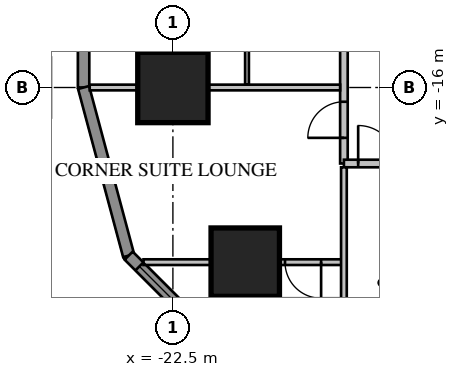
"""IFC4 building model, lengths in metres.
Left out: names, types, materials, properties, quantities, classifications, styles, units other than length and angle.
Written with IfcOpenShell. Run it as: python <this file> out.ifc"""

import sys

from ifc_helpers import new_model, si_unit, direction, frame, frame_2d, origin, origin_2d, place, context, subcontext, project, spatial, rectangle, extrude, element, fill, save


model = new_model("IFC4")
c1 = context("Model", 3, precision=1e-05, world=origin(), true_north=direction((0.0, 1.0)))
c2 = subcontext(c1, "Body", "Model", "MODEL_VIEW")
j1 = project(units=[si_unit("LENGTHUNIT", "METRE"), si_unit("PLANEANGLEUNIT", "RADIAN")], contexts=[c1])
p1 = place(None, origin())
s1 = spatial("IfcSite", under=j1, at=p1, CompositionType="ELEMENT")
p2 = place(p1, origin())
s2 = spatial("IfcBuilding", under=s1, at=p2, CompositionType="ELEMENT")
p3 = place(p2, frame((0.0, 0.0, 50.65)))
s3 = spatial("IfcBuildingStorey", under=s2, at=p3, CompositionType="ELEMENT", Elevation=50.65)
p4 = place(p3, frame((-22.5, -16.0, 0.0), z_axis=(0.0, 0.0, 1.0), x_axis=(1.0, 0.0, 0.0)))
e1 = element("IfcColumn", 1, at=p4, inside=s3, PredefinedType="COLUMN", context=c2, shape_type="SweptSolid", body=[
    extrude(rectangle(XDim=1.85, YDim=1.85, at=origin_2d()), origin(), (0.0, 0.0, 1.0), 3.413),
])
p5 = place(p3, frame((-20.596, -20.596, 0.0), z_axis=(0.0, 0.0, 1.0), x_axis=(1.0, 0.0, 0.0)))
e2 = element("IfcColumn", 2, at=p5, inside=s3, PredefinedType="COLUMN", context=c2, shape_type="SweptSolid", body=[
    extrude(rectangle(XDim=1.8, YDim=1.8, at=origin_2d()), origin(), (0.0, 0.0, 1.0), 3.413),
])
p6 = place(p3, frame((-24.85, 16.0, 0.0), z_axis=(0.0, 0.0, 1.0), x_axis=(0.0, -1.0, 0.0)))
e3 = element("IfcWall", 3, at=p6, inside=s3, PredefinedType="SOLIDWALL", context=c2, shape_type="SweptSolid", body=[
    extrude(rectangle(XDim=32.0, YDim=0.3, at=frame_2d((16.0, 0.0))), origin(), (0.0, 0.0, 1.0), 3.65),
])
p7 = place(p6, frame((1.2, 0.0, 0.75)))
e4 = element("IfcOpeningElement", 4, at=p7, cuts=e3, PredefinedType="OPENING", context=c2, shape_type="SweptSolid", body=[
    extrude(rectangle(XDim=1.6, YDim=1.8, at=frame_2d((0.8, 0.9))), frame((0.0, 0.17, 0.0), z_axis=(0.0, -1.0, 0.0), x_axis=(1.0, 0.0, 0.0)), (0.0, 0.0, 1.0), 0.34),
])
p8 = place(p6, frame((5.2, 0.0, 0.75)))
e5 = element("IfcOpeningElement", 5, at=p8, cuts=e3, PredefinedType="OPENING", context=c2, shape_type="SweptSolid", body=[
    extrude(rectangle(XDim=1.6, YDim=1.8, at=frame_2d((0.8, 0.9))), frame((0.0, 0.17, 0.0), z_axis=(0.0, -1.0, 0.0), x_axis=(1.0, 0.0, 0.0)), (0.0, 0.0, 1.0), 0.34),
])
p9 = place(p6, frame((17.2, 0.0, 0.75)))
e6 = element("IfcOpeningElement", 6, at=p9, cuts=e3, PredefinedType="OPENING", context=c2, shape_type="SweptSolid", body=[
    extrude(rectangle(XDim=1.6, YDim=1.8, at=frame_2d((0.8, 0.9))), frame((0.0, 0.17, 0.0), z_axis=(0.0, -1.0, 0.0), x_axis=(1.0, 0.0, 0.0)), (0.0, 0.0, 1.0), 0.34),
])
p10 = place(p6, frame((21.2, 0.0, 0.75)))
e7 = element("IfcOpeningElement", 7, at=p10, cuts=e3, PredefinedType="OPENING", context=c2, shape_type="SweptSolid", body=[
    extrude(rectangle(XDim=1.6, YDim=1.8, at=frame_2d((0.8, 0.9))), frame((0.0, 0.17, 0.0), z_axis=(0.0, -1.0, 0.0), x_axis=(1.0, 0.0, 0.0)), (0.0, 0.0, 1.0), 0.34),
])
p11 = place(p6, frame((25.2, 0.0, 0.75)))
e8 = element("IfcOpeningElement", 8, at=p11, cuts=e3, PredefinedType="OPENING", context=c2, shape_type="SweptSolid", body=[
    extrude(rectangle(XDim=1.6, YDim=1.8, at=frame_2d((0.8, 0.9))), frame((0.0, 0.17, 0.0), z_axis=(0.0, -1.0, 0.0), x_axis=(1.0, 0.0, 0.0)), (0.0, 0.0, 1.0), 0.34),
])
p12 = place(p6, frame((29.2, 0.0, 0.75)))
e9 = element("IfcOpeningElement", 9, at=p12, cuts=e3, PredefinedType="OPENING", context=c2, shape_type="SweptSolid", body=[
    extrude(rectangle(XDim=1.6, YDim=1.8, at=frame_2d((0.8, 0.9))), frame((0.0, 0.17, 0.0), z_axis=(0.0, -1.0, 0.0), x_axis=(1.0, 0.0, 0.0)), (0.0, 0.0, 1.0), 0.34),
])
p13 = place(p6, frame((8.8, 0.0, 0.75)))
e10 = element("IfcOpeningElement", 10, at=p13, cuts=e3, PredefinedType="OPENING", context=c2, shape_type="SweptSolid", body=[
    extrude(rectangle(XDim=2.4, YDim=1.8, at=frame_2d((1.2, 0.9))), frame((0.0, 0.17, 0.0), z_axis=(0.0, -1.0, 0.0), x_axis=(1.0, 0.0, 0.0)), (0.0, 0.0, 1.0), 0.34),
])
p14 = place(p6, frame((13.812, 0.0, 0.0)))
e11 = element("IfcOpeningElement", 11, at=p14, cuts=e3, PredefinedType="OPENING", context=c2, shape_type="SweptSolid", body=[
    extrude(rectangle(XDim=1.0, YDim=2.4, at=frame_2d((0.5, 1.2))), frame((0.0, 0.17, 0.0), z_axis=(0.0, -1.0, 0.0), x_axis=(1.0, 0.0, 0.0)), (0.0, 0.0, 1.0), 0.34),
])
p15 = place(p3, frame((-24.85, -16.0, 0.0), z_axis=(0.0, 0.0, 1.0), x_axis=(0.258839972501, -0.965920218567, 0.0)))
e12 = element("IfcWall", 12, at=p15, inside=s3, PredefinedType="SOLIDWALL", context=c2, shape_type="SweptSolid", body=[
    extrude(rectangle(XDim=4.581, YDim=0.3, at=frame_2d((2.291, 0.0))), origin(), (0.0, 0.0, 1.0), 3.65),
])
p16 = place(p3, frame((-23.664, -20.425, 0.0), z_axis=(0.0, 0.0, 1.0), x_axis=(0.707106781187, -0.707106781187, 0.0)))
e13 = element("IfcWall", 13, at=p16, inside=s3, PredefinedType="SOLIDWALL", context=c2, shape_type="SweptSolid", body=[
    extrude(rectangle(XDim=4.581, YDim=0.3, at=frame_2d((2.291, 0.0))), origin(), (0.0, 0.0, 1.0), 3.65),
])
p17 = place(p16, frame((0.4, 0.0, 0.75)))
e14 = element("IfcOpeningElement", 14, at=p17, cuts=e13, PredefinedType="OPENING", context=c2, shape_type="SweptSolid", body=[
    extrude(rectangle(XDim=3.781, YDim=1.8, at=frame_2d((1.891, 0.9))), frame((0.0, 0.17, 0.0), z_axis=(0.0, -1.0, 0.0), x_axis=(1.0, 0.0, 0.0)), (0.0, 0.0, 1.0), 0.34),
])
p18 = place(p3, frame((-18.0, 18.0, 0.0), z_axis=(0.0, 0.0, 1.0), x_axis=(0.0, -1.0, 0.0)))
e15 = element("IfcWall", 15, at=p18, inside=s3, PredefinedType="PARTITIONING", context=c2, shape_type="SweptSolid", body=[
    extrude(rectangle(XDim=36.0, YDim=0.2, at=frame_2d((18.0, 0.0))), origin(), (0.0, 0.0, 1.0), 3.65),
])
p19 = place(p18, frame((0.375, 0.0, 0.0)))
e16 = element("IfcOpeningElement", 16, at=p19, cuts=e15, PredefinedType="OPENING", context=c2, shape_type="SweptSolid", body=[
    extrude(rectangle(XDim=1.0, YDim=2.1, at=frame_2d((0.5, 1.05))), frame((0.0, 0.12, 0.0), z_axis=(0.0, -1.0, 0.0), x_axis=(1.0, 0.0, 0.0)), (0.0, 0.0, 1.0), 0.24),
])
p20 = place(p18, frame((2.375, 0.0, 0.0)))
e17 = element("IfcOpeningElement", 17, at=p20, cuts=e15, PredefinedType="OPENING", context=c2, shape_type="SweptSolid", body=[
    extrude(rectangle(XDim=0.95, YDim=2.1, at=frame_2d((0.475, 1.05))), frame((0.0, 0.12, 0.0), z_axis=(0.0, -1.0, 0.0), x_axis=(1.0, 0.0, 0.0)), (0.0, 0.0, 1.0), 0.24),
])
p21 = place(p18, frame((7.95, 0.0, 0.0)))
e18 = element("IfcOpeningElement", 18, at=p21, cuts=e15, PredefinedType="OPENING", context=c2, shape_type="SweptSolid", body=[
    extrude(rectangle(XDim=0.95, YDim=2.1, at=frame_2d((0.475, 1.05))), frame((0.0, 0.12, 0.0), z_axis=(0.0, -1.0, 0.0), x_axis=(1.0, 0.0, 0.0)), (0.0, 0.0, 1.0), 0.24),
])
p22 = place(p18, frame((18.375, 0.0, 0.0)))
e19 = element("IfcOpeningElement", 19, at=p22, cuts=e15, PredefinedType="OPENING", context=c2, shape_type="SweptSolid", body=[
    extrude(rectangle(XDim=0.95, YDim=2.1, at=frame_2d((0.475, 1.05))), frame((0.0, 0.12, 0.0), z_axis=(0.0, -1.0, 0.0), x_axis=(1.0, 0.0, 0.0)), (0.0, 0.0, 1.0), 0.24),
])
p23 = place(p18, frame((23.95, 0.0, 0.0)))
e20 = element("IfcOpeningElement", 20, at=p23, cuts=e15, PredefinedType="OPENING", context=c2, shape_type="SweptSolid", body=[
    extrude(rectangle(XDim=0.95, YDim=2.1, at=frame_2d((0.475, 1.05))), frame((0.0, 0.12, 0.0), z_axis=(0.0, -1.0, 0.0), x_axis=(1.0, 0.0, 0.0)), (0.0, 0.0, 1.0), 0.24),
])
p24 = place(p18, frame((26.375, 0.0, 0.0)))
e21 = element("IfcOpeningElement", 21, at=p24, cuts=e15, PredefinedType="OPENING", context=c2, shape_type="SweptSolid", body=[
    extrude(rectangle(XDim=0.95, YDim=2.1, at=frame_2d((0.475, 1.05))), frame((0.0, 0.12, 0.0), z_axis=(0.0, -1.0, 0.0), x_axis=(1.0, 0.0, 0.0)), (0.0, 0.0, 1.0), 0.24),
])
p25 = place(p18, frame((31.95, 0.0, 0.0)))
e22 = element("IfcOpeningElement", 22, at=p25, cuts=e15, PredefinedType="OPENING", context=c2, shape_type="SweptSolid", body=[
    extrude(rectangle(XDim=0.95, YDim=2.1, at=frame_2d((0.475, 1.05))), frame((0.0, 0.12, 0.0), z_axis=(0.0, -1.0, 0.0), x_axis=(1.0, 0.0, 0.0)), (0.0, 0.0, 1.0), 0.24),
])
p26 = place(p18, frame((34.375, 0.0, 0.0)))
e23 = element("IfcOpeningElement", 23, at=p26, cuts=e15, PredefinedType="OPENING", context=c2, shape_type="SweptSolid", body=[
    extrude(rectangle(XDim=0.95, YDim=2.1, at=frame_2d((0.475, 1.05))), frame((0.0, 0.12, 0.0), z_axis=(0.0, -1.0, 0.0), x_axis=(1.0, 0.0, 0.0)), (0.0, 0.0, 1.0), 0.24),
])
p27 = place(p18, frame((11.2, 0.0, 0.0)))
e24 = element("IfcOpeningElement", 24, at=p27, cuts=e15, PredefinedType="OPENING", context=c2, shape_type="SweptSolid", body=[
    extrude(rectangle(XDim=1.0, YDim=2.1, at=frame_2d((0.5, 1.05))), frame((0.0, 0.12, 0.0), z_axis=(0.0, -1.0, 0.0), x_axis=(1.0, 0.0, 0.0)), (0.0, 0.0, 1.0), 0.24),
])
p28 = place(p3, frame((-18.1, -16.0, 0.0), z_axis=(0.0, 0.0, 1.0), x_axis=(-1.0, 0.0, 0.0)))
e25 = element("IfcWall", 25, at=p28, inside=s3, PredefinedType="PARTITIONING", context=c2, shape_type="SweptSolid", body=[
    extrude(rectangle(XDim=6.589, YDim=0.15, at=frame_2d((3.295, 0.0))), origin(), (0.0, 0.0, 1.0), 3.65),
])
p29 = place(p3, frame((-18.065, -20.596, 0.0), z_axis=(0.0, 0.0, 1.0), x_axis=(-1.0, 0.0, 0.0)))
e26 = element("IfcWall", 26, at=p29, inside=s3, PredefinedType="PARTITIONING", context=c2, shape_type="SweptSolid", body=[
    extrude(rectangle(XDim=5.209, YDim=0.15, at=frame_2d((2.604, 0.0))), origin(), (0.0, 0.0, 1.0), 3.65),
])
p30 = place(p29, frame((0.535, 0.0, 0.0)))
e27 = element("IfcOpeningElement", 27, at=p30, cuts=e26, PredefinedType="OPENING", context=c2, shape_type="SweptSolid", body=[
    extrude(rectangle(XDim=0.95, YDim=2.1, at=frame_2d((0.475, 1.05))), frame((0.0, 0.095, 0.0), z_axis=(0.0, -1.0, 0.0), x_axis=(1.0, 0.0, 0.0)), (0.0, 0.0, 1.0), 0.19),
])
p31 = place(p3, frame((-18.0, -18.0, 0.0), z_axis=(0.0, 0.0, 1.0), x_axis=(1.0, 0.0, 0.0)))
e28 = element("IfcWall", 28, at=p31, inside=s3, PredefinedType="PARTITIONING", context=c2, shape_type="SweptSolid", body=[
    extrude(rectangle(XDim=36.0, YDim=0.2, at=frame_2d((18.0, 0.0))), origin(), (0.0, 0.0, 1.0), 3.65),
])
p32 = place(p31, frame((0.375, 0.0, 0.0)))
e29 = element("IfcOpeningElement", 29, at=p32, cuts=e28, PredefinedType="OPENING", context=c2, shape_type="SweptSolid", body=[
    extrude(rectangle(XDim=1.0, YDim=2.1, at=frame_2d((0.5, 1.05))), frame((0.0, 0.12, 0.0), z_axis=(0.0, -1.0, 0.0), x_axis=(1.0, 0.0, 0.0)), (0.0, 0.0, 1.0), 0.24),
])
p33 = place(p31, frame((2.45, 0.0, 0.0)))
e30 = element("IfcOpeningElement", 30, at=p33, cuts=e28, PredefinedType="OPENING", context=c2, shape_type="SweptSolid", body=[
    extrude(rectangle(XDim=0.8, YDim=2.1, at=frame_2d((0.4, 1.05))), frame((0.0, 0.12, 0.0), z_axis=(0.0, -1.0, 0.0), x_axis=(1.0, 0.0, 0.0)), (0.0, 0.0, 1.0), 0.24),
])
p34 = place(p31, frame((4.05, 0.0, 0.0)))
e31 = element("IfcOpeningElement", 31, at=p34, cuts=e28, PredefinedType="OPENING", context=c2, shape_type="SweptSolid", body=[
    extrude(rectangle(XDim=1.0, YDim=2.1, at=frame_2d((0.5, 1.05))), frame((0.0, 0.12, 0.0), z_axis=(0.0, -1.0, 0.0), x_axis=(1.0, 0.0, 0.0)), (0.0, 0.0, 1.0), 0.24),
])
p35 = place(p31, frame((6.45, 0.0, 0.0)))
e32 = element("IfcOpeningElement", 32, at=p35, cuts=e28, PredefinedType="OPENING", context=c2, shape_type="SweptSolid", body=[
    extrude(rectangle(XDim=0.9, YDim=2.1, at=frame_2d((0.45, 1.05))), frame((0.0, 0.12, 0.0), z_axis=(0.0, -1.0, 0.0), x_axis=(1.0, 0.0, 0.0)), (0.0, 0.0, 1.0), 0.24),
])
p36 = place(p31, frame((8.15, 0.0, 0.0)))
e33 = element("IfcOpeningElement", 33, at=p36, cuts=e28, PredefinedType="OPENING", context=c2, shape_type="SweptSolid", body=[
    extrude(rectangle(XDim=1.0, YDim=2.1, at=frame_2d((0.5, 1.05))), frame((0.0, 0.12, 0.0), z_axis=(0.0, -1.0, 0.0), x_axis=(1.0, 0.0, 0.0)), (0.0, 0.0, 1.0), 0.24),
])
p37 = place(p31, frame((19.95, 0.0, 0.0)))
e34 = element("IfcOpeningElement", 34, at=p37, cuts=e28, PredefinedType="OPENING", context=c2, shape_type="SweptSolid", body=[
    extrude(rectangle(XDim=0.95, YDim=2.1, at=frame_2d((0.475, 1.05))), frame((0.0, 0.12, 0.0), z_axis=(0.0, -1.0, 0.0), x_axis=(1.0, 0.0, 0.0)), (0.0, 0.0, 1.0), 0.24),
])
p38 = place(p31, frame((23.95, 0.0, 0.0)))
e35 = element("IfcOpeningElement", 35, at=p38, cuts=e28, PredefinedType="OPENING", context=c2, shape_type="SweptSolid", body=[
    extrude(rectangle(XDim=0.95, YDim=2.1, at=frame_2d((0.475, 1.05))), frame((0.0, 0.12, 0.0), z_axis=(0.0, -1.0, 0.0), x_axis=(1.0, 0.0, 0.0)), (0.0, 0.0, 1.0), 0.24),
])
p39 = place(p31, frame((27.95, 0.0, 0.0)))
e36 = element("IfcOpeningElement", 36, at=p39, cuts=e28, PredefinedType="OPENING", context=c2, shape_type="SweptSolid", body=[
    extrude(rectangle(XDim=0.95, YDim=2.1, at=frame_2d((0.475, 1.05))), frame((0.0, 0.12, 0.0), z_axis=(0.0, -1.0, 0.0), x_axis=(1.0, 0.0, 0.0)), (0.0, 0.0, 1.0), 0.24),
])
p40 = place(p31, frame((31.95, 0.0, 0.0)))
e37 = element("IfcOpeningElement", 37, at=p40, cuts=e28, PredefinedType="OPENING", context=c2, shape_type="SweptSolid", body=[
    extrude(rectangle(XDim=0.95, YDim=2.1, at=frame_2d((0.475, 1.05))), frame((0.0, 0.12, 0.0), z_axis=(0.0, -1.0, 0.0), x_axis=(1.0, 0.0, 0.0)), (0.0, 0.0, 1.0), 0.24),
])
p41 = place(p31, frame((34.375, 0.0, 0.0)))
e38 = element("IfcOpeningElement", 38, at=p41, cuts=e28, PredefinedType="OPENING", context=c2, shape_type="SweptSolid", body=[
    extrude(rectangle(XDim=0.95, YDim=2.1, at=frame_2d((0.475, 1.05))), frame((0.0, 0.12, 0.0), z_axis=(0.0, -1.0, 0.0), x_axis=(1.0, 0.0, 0.0)), (0.0, 0.0, 1.0), 0.24),
])
p42 = place(p31, frame((11.2, 0.0, 0.0)))
e39 = element("IfcOpeningElement", 39, at=p42, cuts=e28, PredefinedType="OPENING", context=c2, shape_type="SweptSolid", body=[
    extrude(rectangle(XDim=1.0, YDim=2.1, at=frame_2d((0.5, 1.05))), frame((0.0, 0.12, 0.0), z_axis=(0.0, -1.0, 0.0), x_axis=(1.0, 0.0, 0.0)), (0.0, 0.0, 1.0), 0.24),
])
p43 = place(p3, frame((-18.0, -18.1, 0.0), z_axis=(0.0, 0.0, 1.0), x_axis=(0.0, -1.0, 0.0)))
e40 = element("IfcWall", 40, at=p43, inside=s3, PredefinedType="PARTITIONING", context=c2, shape_type="SweptSolid", body=[
    extrude(rectangle(XDim=6.053, YDim=0.15, at=frame_2d((3.027, 0.0))), origin(), (0.0, 0.0, 1.0), 3.65),
])
p44 = place(p3, frame((-20.55, -13.775, 0.0), z_axis=(0.0, 0.0, 1.0), x_axis=(0.0, -1.0, 0.0)))
e41 = element("IfcWall", 41, at=p44, inside=s3, PredefinedType="PARTITIONING", context=c2, shape_type="SweptSolid", body=[
    extrude(rectangle(XDim=2.15, YDim=0.1, at=frame_2d((1.075, 0.0))), origin(), (0.0, 0.0, 1.0), 3.65),
])
p45 = place(p44, frame((0.2, 0.0, 0.0)))
e42 = element("IfcOpeningElement", 42, at=p45, cuts=e41, PredefinedType="OPENING", context=c2, shape_type="SweptSolid", body=[
    extrude(rectangle(XDim=0.9, YDim=2.1, at=frame_2d((0.45, 1.05))), frame((0.0, 0.07, 0.0), z_axis=(0.0, -1.0, 0.0), x_axis=(1.0, 0.0, 0.0)), (0.0, 0.0, 1.0), 0.14),
])
p46 = place(p17, origin())
e43 = element("IfcWindow", 43, at=p46, inside=s3, PartitioningType="SINGLE_PANEL", PredefinedType="WINDOW", context=c2, shape_type="SweptSolid", body=[
    extrude(rectangle(XDim=3.781, YDim=1.8, at=frame_2d((1.891, 0.9))), frame((0.0, 0.03, 0.0), z_axis=(0.0, -1.0, 0.0), x_axis=(1.0, 0.0, 0.0)), (0.0, 0.0, 1.0), 0.06),
])
fill(e14, e43)
p47 = place(p26, origin())
e44 = element("IfcDoor", 44, at=p47, inside=s3, OperationType="SINGLE_SWING_RIGHT", PredefinedType="DOOR", context=c2, shape_type="SweptSolid", body=[
    extrude(rectangle(XDim=0.95, YDim=2.1, at=frame_2d((0.475, 1.05))), frame((0.0, 0.025, 0.0), z_axis=(0.0, -1.0, 0.0), x_axis=(1.0, 0.0, 0.0)), (0.0, 0.0, 1.0), 0.05),
])
fill(e23, e44)
p48 = place(p30, origin())
e45 = element("IfcDoor", 45, at=p48, inside=s3, OperationType="SINGLE_SWING_LEFT", PredefinedType="DOOR", context=c2, shape_type="SweptSolid", body=[
    extrude(rectangle(XDim=0.95, YDim=2.1, at=frame_2d((0.475, 1.05))), frame((0.0, 0.025, 0.0), z_axis=(0.0, -1.0, 0.0), x_axis=(1.0, 0.0, 0.0)), (0.0, 0.0, 1.0), 0.05),
])
fill(e27, e45)
p49 = place(p32, origin())
e46 = element("IfcDoor", 46, at=p49, inside=s3, OperationType="SINGLE_SWING_LEFT", PredefinedType="DOOR", context=c2, shape_type="SweptSolid", body=[
    extrude(rectangle(XDim=1.0, YDim=2.1, at=frame_2d((0.5, 1.05))), frame((0.0, 0.025, 0.0), z_axis=(0.0, -1.0, 0.0), x_axis=(1.0, 0.0, 0.0)), (0.0, 0.0, 1.0), 0.05),
])
fill(e29, e46)
save(model, sys.argv[1])
